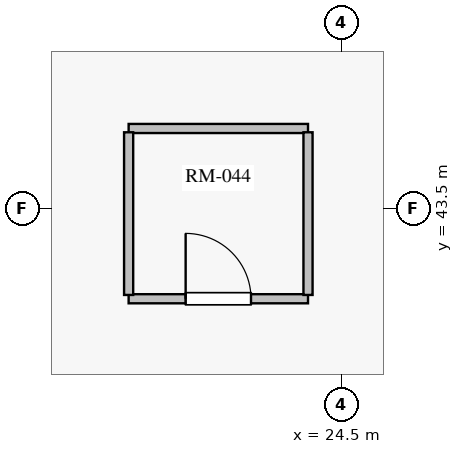
"""IFC4 building model, lengths in metres.
Left out: names, types, materials, properties, quantities, classifications, styles, units other than length and angle.
Written with IfcOpenShell. Run it as: python <this file> out.ifc"""

import sys

from ifc_helpers import new_model, si_unit, direction, frame, frame_2d, origin, origin_with_axes, place, context, subcontext, project, spatial, rectangle, extrude, source, transform, mapped, element, fill, save


model = new_model("IFC4")
c1 = context("Model", 3, precision=1e-05, world=origin(), true_north=direction((0.0, 1.0)))
c2 = subcontext(c1, "Body", "Model", "MODEL_VIEW")
j1 = project(units=[si_unit("LENGTHUNIT", "METRE"), si_unit("PLANEANGLEUNIT", "RADIAN")], contexts=[c1])
p1 = place(None, origin())
s1 = spatial("IfcSite", under=j1, at=p1, CompositionType="ELEMENT")
p2 = place(p1, origin())
s2 = spatial("IfcBuilding", under=s1, at=p2, CompositionType="ELEMENT")
p3 = place(p2, frame((0.0, 0.0, 216.9)))
s3 = spatial("IfcBuildingStorey", under=s2, at=p3, CompositionType="ELEMENT", Elevation=216.9)
p4 = place(p3, frame((30.662, 49.275, 0.0), z_axis=(0.0, 0.0, 1.0), x_axis=(-0.957541243274, -0.288296318792, 0.0)))
e1 = element("IfcWall", 1, at=p4, inside=s3, PredefinedType="SOLIDWALL", context=c2, shape_type="SweptSolid", body=[
    extrude(rectangle(XDim=12.727, YDim=0.28, at=frame_2d((6.364, 0.0))), origin(), (0.0, 0.0, 1.0), 2.85),
])
p5 = place(p4, frame((1.574, 0.0, 0.85)))
e2 = element("IfcOpeningElement", 2, at=p5, cuts=e1, PredefinedType="OPENING", context=c2, shape_type="SweptSolid", body=[
    extrude(rectangle(XDim=1.6, YDim=1.6, at=frame_2d((0.8, 0.8))), frame((0.0, 0.15, 0.0), z_axis=(0.0, -1.0, 0.0), x_axis=(1.0, 0.0, 0.0)), (0.0, 0.0, 1.0), 0.3),
])
p6 = place(p4, frame((5.564, 0.0, 0.85)))
e3 = element("IfcOpeningElement", 3, at=p6, cuts=e1, PredefinedType="OPENING", context=c2, shape_type="SweptSolid", body=[
    extrude(rectangle(XDim=1.6, YDim=1.6, at=frame_2d((0.8, 0.8))), frame((0.0, 0.15, 0.0), z_axis=(0.0, -1.0, 0.0), x_axis=(1.0, 0.0, 0.0)), (0.0, 0.0, 1.0), 0.3),
])
p7 = place(p4, frame((9.552, 0.0, 0.85)))
e4 = element("IfcOpeningElement", 4, at=p7, cuts=e1, PredefinedType="OPENING", context=c2, shape_type="SweptSolid", body=[
    extrude(rectangle(XDim=1.6, YDim=1.6, at=frame_2d((0.8, 0.8))), frame((0.0, 0.15, 0.0), z_axis=(0.0, -1.0, 0.0), x_axis=(1.0, 0.0, 0.0)), (0.0, 0.0, 1.0), 0.3),
])
p8 = place(p3, frame((21.702, 42.314, 0.0), z_axis=(0.0, 0.0, 1.0), x_axis=(1.0, 0.0, 0.0)))
e5 = element("IfcWall", 5, at=p8, inside=s3, PredefinedType="PARTITIONING", context=c2, shape_type="SweptSolid", body=[
    extrude(rectangle(XDim=2.36, YDim=0.12, at=frame_2d((1.18, 0.0))), origin(), (0.0, 0.0, 1.0), 2.85),
])
p9 = place(p8, frame((0.75, 0.0, 0.0)))
e6 = element("IfcOpeningElement", 6, at=p9, cuts=e5, PredefinedType="OPENING", context=c2, shape_type="SweptSolid", body=[
    extrude(rectangle(XDim=0.86, YDim=2.1, at=frame_2d((0.43, 1.05))), frame((0.0, 0.07, 0.0), z_axis=(0.0, -1.0, 0.0), x_axis=(1.0, 0.0, 0.0)), (0.0, 0.0, 1.0), 0.14),
])
p10 = place(p3, frame((24.062, 44.554, 0.0), z_axis=(0.0, 0.0, 1.0), x_axis=(-1.0, 0.0, 0.0)))
e7 = element("IfcWall", 7, at=p10, inside=s3, PredefinedType="PARTITIONING", context=c2, shape_type="SweptSolid", body=[
    extrude(rectangle(XDim=2.36, YDim=0.12, at=frame_2d((1.18, 0.0))), origin(), (0.0, 0.0, 1.0), 2.85),
])
for number, where, z_axis, x_axis in (
    (8, (24.062, 42.364, 0.0), (0.0, 0.0, 1.0), (0.0, 1.0, 0.0)),
    (9, (21.702, 44.504, 0.0), (0.0, 0.0, 1.0), (0.0, -1.0, 0.0)),
):
    element("IfcWall", number, at=place(p3, frame(where, z_axis=z_axis, x_axis=x_axis)), inside=s3, PredefinedType="PARTITIONING", context=c2, shape_type="SweptSolid", body=[
        extrude(rectangle(XDim=2.14, YDim=0.12, at=frame_2d((1.07, 0.0))), origin(), (0.0, 0.0, 1.0), 2.85),
    ])
m1 = source(origin_with_axes(), c2, "Body", "SweptSolid", [
    extrude(rectangle(XDim=0.86, YDim=2.1, at=frame_2d((0.43, 1.05))), frame((0.0, 0.025, 0.0), z_axis=(0.0, -1.0, 0.0), x_axis=(1.0, 0.0, 0.0)), (0.0, 0.0, 1.0), 0.05),
])
p11 = place(p9, origin())
e10 = element("IfcDoor", 10, at=p11, inside=s3, OperationType="SINGLE_SWING_LEFT", PredefinedType="DOOR", context=c2, shape_type="MappedRepresentation", body=[
    mapped(m1, transform((0.0, 0.0, 0.0), scale=1.0)),
])
fill(e6, e10)
save(model, sys.argv[1])
